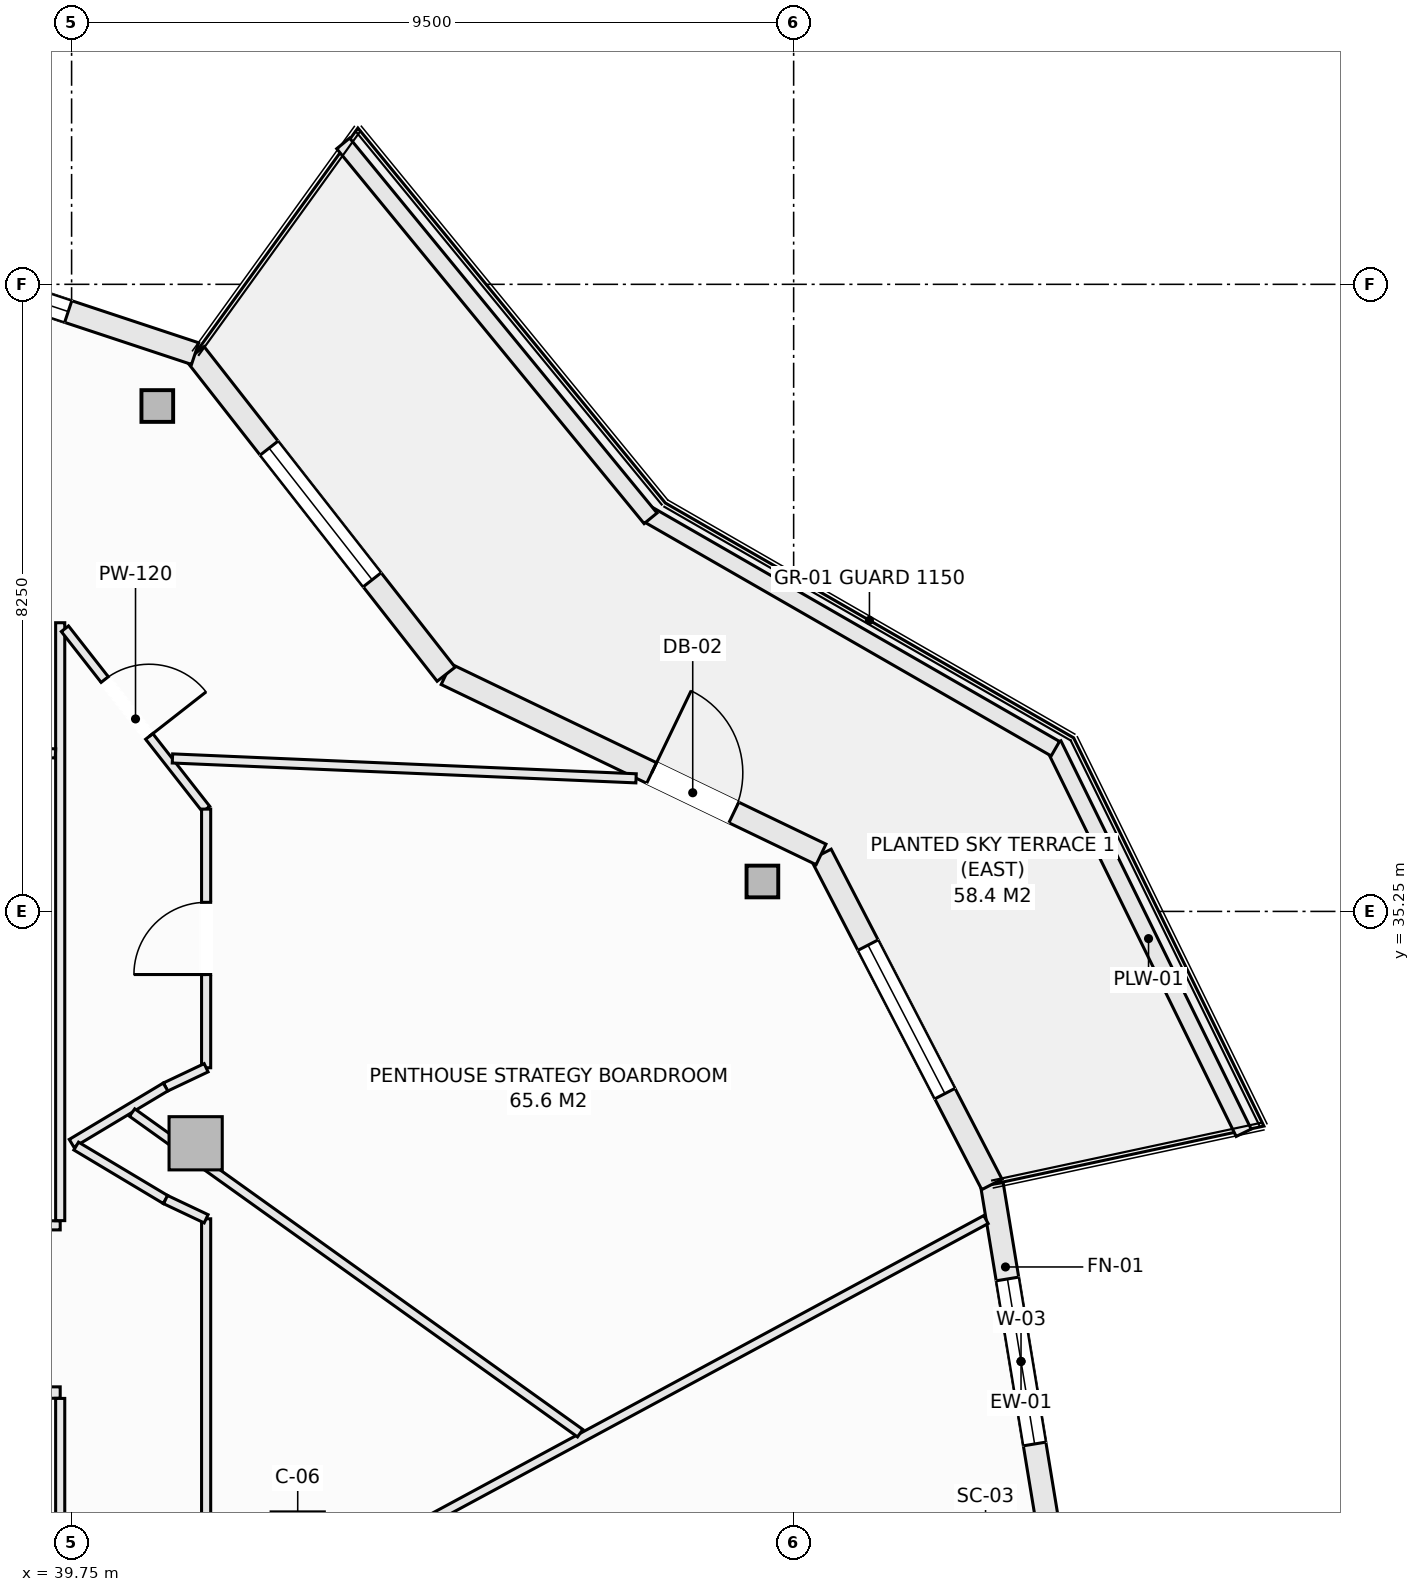
"""IFC4 building model, lengths in metres.
Left out: names, types, materials, properties, quantities, classifications, styles, units other than length and angle.
Written with IfcOpenShell. Run it as: python <this file> out.ifc"""

import sys

from ifc_helpers import new_model, si_unit, direction, frame, frame_2d, origin, origin_2d, place, context, subcontext, project, spatial, rectangle, hollow_rectangle, extrude, element, fill, save


model = new_model("IFC4")
c1 = context("Model", 3, precision=1e-05, world=origin(), true_north=direction((0.0, 1.0)))
c2 = subcontext(c1, "Body", "Model", "MODEL_VIEW")
j1 = project(units=[si_unit("LENGTHUNIT", "METRE"), si_unit("PLANEANGLEUNIT", "RADIAN")], contexts=[c1])
p1 = place(None, origin())
s1 = spatial("IfcSite", under=j1, at=p1, CompositionType="ELEMENT")
p2 = place(p1, origin())
s2 = spatial("IfcBuilding", under=s1, at=p2, CompositionType="ELEMENT")
p3 = place(p2, frame((0.0, 0.0, 255.8)))
s3 = spatial("IfcBuildingStorey", under=s2, at=p3, CompositionType="ELEMENT", Elevation=255.8)
for number, where, z_axis, x_axis in (
    (1, (48.839, 35.644, -0.27), (0.0, 0.0, 1.0), (1.0, 0.0, 0.0)),
    (2, (40.878, 41.899, -0.27), (0.0, 0.0, 1.0), (1.0, 0.0, 0.0)),
):
    element("IfcColumn", number, at=place(p3, frame(where, z_axis=z_axis, x_axis=x_axis)), inside=s3, PredefinedType="COLUMN", context=c2, shape_type="SweptSolid", body=[
        extrude(hollow_rectangle(XDim=0.406, YDim=0.406, WallThickness=0.016, at=origin_2d()), origin(), (0.0, 0.0, 1.0), 3.3),
    ])
for number, where, z_axis, x_axis in (
    (3, (42.725, 27.0, -0.27), (0.0, 0.0, 1.0), (1.0, 0.0, 0.0)),
    (4, (41.382, 32.199, -0.27), (0.0, 0.0, 1.0), (1.0, 0.0, 0.0)),
):
    element("IfcColumn", number, at=place(p3, frame(where, z_axis=z_axis, x_axis=x_axis)), inside=s3, PredefinedType="COLUMN", context=c2, shape_type="SweptSolid", body=[
        extrude(rectangle(XDim=0.7, YDim=0.7, at=origin_2d()), origin(), (0.0, 0.0, 1.0), 3.3),
    ])
p4 = place(p3, frame((51.858, 31.659, 0.0), z_axis=(0.0, 0.0, 1.0), x_axis=(0.162369371657, -0.986730047758, 0.0)))
e5 = element("IfcWall", 5, at=p4, inside=s3, PredefinedType="SOLIDWALL", context=c2, shape_type="SweptSolid", body=[
    extrude(rectangle(XDim=4.721, YDim=0.3, at=frame_2d((2.361, 0.0))), origin(), (0.0, 0.0, 1.0), 2.605),
])
p5 = place(p4, frame((1.261, 0.0, 0.72)))
e6 = element("IfcOpeningElement", 6, at=p5, cuts=e5, PredefinedType="OPENING", context=c2, shape_type="SweptSolid", body=[
    extrude(rectangle(XDim=2.2, YDim=1.65, at=frame_2d((1.1, 0.825))), frame((0.0, 0.16, 0.0), z_axis=(0.0, -1.0, 0.0), x_axis=(1.0, 0.0, 0.0)), (0.0, 0.0, 1.0), 0.32),
])
p6 = place(p3, frame((49.611, 36.0, 0.0), z_axis=(0.0, 0.0, 1.0), x_axis=(0.459793771602, -0.888025724625, 0.0)))
e7 = element("IfcWall", 7, at=p6, inside=s3, PredefinedType="SOLIDWALL", context=c2, shape_type="SweptSolid", body=[
    extrude(rectangle(XDim=4.889, YDim=0.3, at=frame_2d((2.444, 0.0))), origin(), (0.0, 0.0, 1.0), 2.605),
])
p7 = place(p6, frame((1.344, 0.0, 0.72)))
e8 = element("IfcOpeningElement", 8, at=p7, cuts=e7, PredefinedType="OPENING", context=c2, shape_type="SweptSolid", body=[
    extrude(rectangle(XDim=2.2, YDim=1.65, at=frame_2d((1.1, 0.825))), frame((0.0, 0.16, 0.0), z_axis=(0.0, -1.0, 0.0), x_axis=(1.0, 0.0, 0.0)), (0.0, 0.0, 1.0), 0.32),
])
p8 = place(p3, frame((44.677, 38.37, 0.0), z_axis=(0.0, 0.0, 1.0), x_axis=(0.901355238351, -0.433080517106, 0.0)))
e9 = element("IfcWall", 9, at=p8, inside=s3, PredefinedType="SOLIDWALL", context=c2, shape_type="SweptSolid", body=[
    extrude(rectangle(XDim=5.473, YDim=0.3, at=frame_2d((2.737, 0.0))), origin(), (0.0, 0.0, 1.0), 2.605),
])
p9 = place(p8, frame((3.0, 0.0, 0.0)))
e10 = element("IfcOpeningElement", 10, at=p9, cuts=e9, PredefinedType="OPENING", context=c2, shape_type="SweptSolid", body=[
    extrude(rectangle(XDim=1.2, YDim=2.2, at=frame_2d((0.6, 1.1))), frame((0.0, 0.16, 0.0), z_axis=(0.0, -1.0, 0.0), x_axis=(1.0, 0.0, 0.0)), (0.0, 0.0, 1.0), 0.32),
])
p10 = place(p3, frame((41.375, 42.588, 0.0), z_axis=(0.0, 0.0, 1.0), x_axis=(0.61644588519, -0.787397276241, 0.0)))
e11 = element("IfcWall", 11, at=p10, inside=s3, PredefinedType="SOLIDWALL", context=c2, shape_type="SweptSolid", body=[
    extrude(rectangle(XDim=5.357, YDim=0.3, at=frame_2d((2.678, 0.0))), origin(), (0.0, 0.0, 1.0), 2.605),
])
p11 = place(p10, frame((1.579, 0.0, 0.72)))
e12 = element("IfcOpeningElement", 12, at=p11, cuts=e11, PredefinedType="OPENING", context=c2, shape_type="SweptSolid", body=[
    extrude(rectangle(XDim=2.2, YDim=1.65, at=frame_2d((1.1, 0.825))), frame((0.0, 0.16, 0.0), z_axis=(0.0, -1.0, 0.0), x_axis=(1.0, 0.0, 0.0)), (0.0, 0.0, 1.0), 0.32),
])
p12 = place(p3, frame((35.948, 44.387, 0.0), z_axis=(0.0, 0.0, 1.0), x_axis=(0.949232769585, -0.314574552605, 0.0)))
e13 = element("IfcWall", 13, at=p12, inside=s3, PredefinedType="SOLIDWALL", context=c2, shape_type="SweptSolid", body=[
    extrude(rectangle(XDim=5.717, YDim=0.3, at=frame_2d((2.858, 0.0))), origin(), (0.0, 0.0, 1.0), 2.605),
])
p13 = place(p12, frame((1.758, 0.0, 0.72)))
e14 = element("IfcOpeningElement", 14, at=p13, cuts=e13, PredefinedType="OPENING", context=c2, shape_type="SweptSolid", body=[
    extrude(rectangle(XDim=2.2, YDim=1.65, at=frame_2d((1.1, 0.825))), frame((0.0, 0.16, 0.0), z_axis=(0.0, -1.0, 0.0), x_axis=(1.0, 0.0, 0.0)), (0.0, 0.0, 1.0), 0.32),
])
p14 = place(p3, frame((52.667, 37.447, 0.0), z_axis=(0.0, 0.0, 1.0), x_axis=(0.440058847499, -0.897968936399, 0.0)))
e15 = element("IfcWall", 15, at=p14, inside=s3, PredefinedType="PARAPET", context=c2, shape_type="SweptSolid", body=[
    extrude(rectangle(XDim=5.689, YDim=0.22, at=frame_2d((2.845, 0.0))), origin(), (0.0, 0.0, 1.0), 0.52),
])
p15 = place(p3, frame((47.321, 40.479, 0.0), z_axis=(0.0, 0.0, 1.0), x_axis=(0.866901621005, -0.49847926687, 0.0)))
e16 = element("IfcWall", 16, at=p15, inside=s3, PredefinedType="PARAPET", context=c2, shape_type="SweptSolid", body=[
    extrude(rectangle(XDim=6.197, YDim=0.22, at=frame_2d((3.098, 0.0))), origin(), (0.0, 0.0, 1.0), 0.52),
])
p16 = place(p3, frame((43.323, 45.354, 0.0), z_axis=(0.0, 0.0, 1.0), x_axis=(0.63407318032, -0.77327304492, 0.0)))
e17 = element("IfcWall", 17, at=p16, inside=s3, PredefinedType="PARAPET", context=c2, shape_type="SweptSolid", body=[
    extrude(rectangle(XDim=6.379, YDim=0.22, at=frame_2d((3.189, 0.0))), origin(), (0.0, 0.0, 1.0), 0.52),
])
p17 = place(p3, frame((30.077, 28.92, 0.0), z_axis=(0.0, 0.0, 1.0), x_axis=(1.0, 0.0, 0.0)))
e18 = element("IfcWall", 18, at=p17, inside=s3, PredefinedType="PARTITIONING", context=c2, shape_type="SweptSolid", body=[
    extrude(rectangle(XDim=9.523, YDim=0.15, at=frame_2d((4.762, 0.0))), origin(), (0.0, 0.0, 1.0), 3.03),
])
p18 = place(p3, frame((38.862, 31.12, 0.0), z_axis=(0.0, 0.0, 1.0), x_axis=(1.0, 0.0, 0.0)))
e19 = element("IfcWall", 19, at=p18, inside=s3, PredefinedType="PARTITIONING", context=c2, shape_type="SweptSolid", body=[
    extrude(rectangle(XDim=0.738, YDim=0.12, at=frame_2d((0.369, 0.0))), origin(), (0.0, 0.0, 1.0), 3.03),
])
p19 = place(p3, frame((39.6, 25.197, 0.0), z_axis=(0.0, 0.0, 1.0), x_axis=(0.0, 1.0, 0.0)))
e20 = element("IfcWall", 20, at=p19, inside=s3, PredefinedType="PARTITIONING", context=c2, shape_type="SweptSolid", body=[
    extrude(rectangle(XDim=3.646, YDim=0.12, at=frame_2d((1.823, 0.0))), origin(), (0.0, 0.0, 1.0), 3.03),
])
p20 = place(p3, frame((39.6, 31.182, 0.0), z_axis=(0.0, 0.0, 1.0), x_axis=(0.0, 1.0, 0.0)))
e21 = element("IfcWall", 21, at=p20, inside=s3, PredefinedType="PARTITIONING", context=c2, shape_type="SweptSolid", body=[
    extrude(rectangle(XDim=7.866, YDim=0.12, at=frame_2d((3.933, 0.0))), origin(), (0.0, 0.0, 1.0), 3.03),
])
p21 = place(p3, frame((39.662, 38.969, 0.0), z_axis=(0.0, 0.0, 1.0), x_axis=(0.616500468458, -0.787354540465, 0.0)))
e22 = element("IfcWall", 22, at=p21, inside=s3, PredefinedType="PARTITIONING", context=c2, shape_type="SweptSolid", body=[
    extrude(rectangle(XDim=3.014, YDim=0.12, at=frame_2d((1.507, 0.0))), origin(), (0.0, 0.0, 1.0), 3.03),
])
p22 = place(p21, frame((0.849, 0.0, 0.0)))
e23 = element("IfcOpeningElement", 23, at=p22, cuts=e22, PredefinedType="OPENING", context=c2, shape_type="SweptSolid", body=[
    extrude(rectangle(XDim=0.95, YDim=2.1, at=frame_2d((0.475, 1.05))), frame((0.0, 0.07, 0.0), z_axis=(0.0, -1.0, 0.0), x_axis=(1.0, 0.0, 0.0)), (0.0, 0.0, 1.0), 0.14),
])
p23 = place(p3, frame((41.52, 22.794, 0.0), z_axis=(0.0, 0.0, 1.0), x_axis=(0.0, 1.0, 0.0)))
e24 = element("IfcWall", 24, at=p23, inside=s3, PredefinedType="PARTITIONING", context=c2, shape_type="SweptSolid", body=[
    extrude(rectangle(XDim=8.412, YDim=0.12, at=frame_2d((4.206, 0.0))), origin(), (0.0, 0.0, 1.0), 2.478),
])
p24 = place(p3, frame((41.52, 33.193, 0.0), z_axis=(0.0, 0.0, 1.0), x_axis=(0.0, 1.0, 0.0)))
e25 = element("IfcWall", 25, at=p24, inside=s3, PredefinedType="PARTITIONING", context=c2, shape_type="SweptSolid", body=[
    extrude(rectangle(XDim=3.403, YDim=0.12, at=frame_2d((1.701, 0.0))), origin(), (0.0, 0.0, 1.0), 3.03),
])
p25 = place(p24, frame((1.227, 0.0, 0.0)))
e26 = element("IfcOpeningElement", 26, at=p25, cuts=e25, PredefinedType="OPENING", context=c2, shape_type="SweptSolid", body=[
    extrude(rectangle(XDim=0.95, YDim=2.1, at=frame_2d((0.475, 1.05))), frame((0.0, 0.07, 0.0), z_axis=(0.0, -1.0, 0.0), x_axis=(1.0, 0.0, 0.0)), (0.0, 0.0, 1.0), 0.14),
])
p26 = place(p3, frame((40.986, 32.94, 0.0), z_axis=(0.0, 0.0, 1.0), x_axis=(0.90356951601, 0.428441512621, 0.0)))
e27 = element("IfcWall", 27, at=p26, inside=s3, PredefinedType="PARTITIONING", context=c2, shape_type="SweptSolid", body=[
    extrude(rectangle(XDim=0.591, YDim=0.12, at=frame_2d((0.295, 0.0))), origin(), (0.0, 0.0, 1.0), 3.03),
])
p27 = place(p3, frame((39.75, 32.199, 0.0), z_axis=(0.0, 0.0, 1.0), x_axis=(0.857702120906, 0.514146935996, 0.0)))
e28 = element("IfcWall", 28, at=p27, inside=s3, PredefinedType="PARTITIONING", context=c2, shape_type="SweptSolid", body=[
    extrude(rectangle(XDim=1.441, YDim=0.12, at=frame_2d((0.721, 0.0))), origin(), (0.0, 0.0, 1.0), 3.03),
])
p28 = place(p3, frame((39.81, 32.163, 0.0), z_axis=(0.0, 0.0, 1.0), x_axis=(0.858011245414, -0.513630901273, 0.0)))
e29 = element("IfcWall", 29, at=p28, inside=s3, PredefinedType="PARTITIONING", context=c2, shape_type="SweptSolid", body=[
    extrude(rectangle(XDim=1.37, YDim=0.12, at=frame_2d((0.685, 0.0))), origin(), (0.0, 0.0, 1.0), 3.03),
])
p29 = place(p3, frame((40.986, 31.459, 0.0), z_axis=(0.0, 0.0, 1.0), x_axis=(0.903729424576, -0.428104107847, 0.0)))
e30 = element("IfcWall", 30, at=p29, inside=s3, PredefinedType="PARTITIONING", context=c2, shape_type="SweptSolid", body=[
    extrude(rectangle(XDim=0.591, YDim=0.12, at=frame_2d((0.295, 0.0))), origin(), (0.0, 0.0, 1.0), 3.03),
])
p30 = place(p3, frame((41.582, 25.693, 0.0), z_axis=(0.0, 0.0, 1.0), x_axis=(0.880032375067, 0.474913696195, 0.0)))
e31 = element("IfcWall", 31, at=p30, inside=s3, PredefinedType="PARTITIONING", context=c2, shape_type="SweptSolid", body=[
    extrude(rectangle(XDim=11.589, YDim=0.12, at=frame_2d((5.794, 0.0))), origin(), (0.0, 0.0, 1.0), 1.823),
])
p31 = place(p3, frame((40.546, 32.604, 0.0), z_axis=(0.0, 0.0, 1.0), x_axis=(0.813264440548, -0.581894277116, 0.0)))
e32 = element("IfcWall", 32, at=p31, inside=s3, PredefinedType="PARTITIONING", context=c2, shape_type="SweptSolid", body=[
    extrude(rectangle(XDim=7.249, YDim=0.12, at=frame_2d((3.625, 0.0))), origin(), (0.0, 0.0, 1.0), 3.03),
])
p32 = place(p3, frame((33.699, 37.579, 0.0), z_axis=(0.0, 0.0, 1.0), x_axis=(0.999081056781, -0.042860727724, 0.0)))
e33 = element("IfcWall", 33, at=p32, inside=s3, PredefinedType="PARTITIONING", context=c2, shape_type="SweptSolid", body=[
    extrude(rectangle(XDim=5.844, YDim=0.12, at=frame_2d((2.922, 0.0))), origin(), (0.0, 0.0, 1.0), 2.478),
])
p33 = place(p3, frame((41.077, 37.262, 0.0), z_axis=(0.0, 0.0, 1.0), x_axis=(0.999080744008, -0.042868017834, 0.0)))
e34 = element("IfcWall", 34, at=p33, inside=s3, PredefinedType="PARTITIONING", context=c2, shape_type="SweptSolid", body=[
    extrude(rectangle(XDim=6.105, YDim=0.12, at=frame_2d((3.053, 0.0))), origin(), (0.0, 0.0, 1.0), 2.605),
])
p34 = place(p5, origin())
e35 = element("IfcWindow", 35, at=p34, inside=s3, PartitioningType="SINGLE_PANEL", PredefinedType="WINDOW", context=c2, shape_type="SweptSolid", body=[
    extrude(rectangle(XDim=2.2, YDim=1.65, at=frame_2d((1.1, 0.825))), frame((0.0, 0.03, 0.0), z_axis=(0.0, -1.0, 0.0), x_axis=(1.0, 0.0, 0.0)), (0.0, 0.0, 1.0), 0.06),
])
fill(e6, e35)
p35 = place(p7, origin())
e36 = element("IfcWindow", 36, at=p35, inside=s3, PartitioningType="SINGLE_PANEL", PredefinedType="WINDOW", context=c2, shape_type="SweptSolid", body=[
    extrude(rectangle(XDim=2.2, YDim=1.65, at=frame_2d((1.1, 0.825))), frame((0.0, 0.03, 0.0), z_axis=(0.0, -1.0, 0.0), x_axis=(1.0, 0.0, 0.0)), (0.0, 0.0, 1.0), 0.06),
])
fill(e8, e36)
p36 = place(p9, origin())
e37 = element("IfcDoor", 37, at=p36, inside=s3, OperationType="SINGLE_SWING_LEFT", PredefinedType="DOOR", context=c2, shape_type="SweptSolid", body=[
    extrude(rectangle(XDim=1.2, YDim=2.2, at=frame_2d((0.6, 1.1))), frame((0.0, 0.025, 0.0), z_axis=(0.0, -1.0, 0.0), x_axis=(1.0, 0.0, 0.0)), (0.0, 0.0, 1.0), 0.05),
])
fill(e10, e37)
p37 = place(p11, origin())
e38 = element("IfcWindow", 38, at=p37, inside=s3, PartitioningType="SINGLE_PANEL", PredefinedType="WINDOW", context=c2, shape_type="SweptSolid", body=[
    extrude(rectangle(XDim=2.2, YDim=1.65, at=frame_2d((1.1, 0.825))), frame((0.0, 0.03, 0.0), z_axis=(0.0, -1.0, 0.0), x_axis=(1.0, 0.0, 0.0)), (0.0, 0.0, 1.0), 0.06),
])
fill(e12, e38)
p38 = place(p13, origin())
e39 = element("IfcWindow", 39, at=p38, inside=s3, PartitioningType="SINGLE_PANEL", PredefinedType="WINDOW", context=c2, shape_type="SweptSolid", body=[
    extrude(rectangle(XDim=2.2, YDim=1.65, at=frame_2d((1.1, 0.825))), frame((0.0, 0.03, 0.0), z_axis=(0.0, -1.0, 0.0), x_axis=(1.0, 0.0, 0.0)), (0.0, 0.0, 1.0), 0.06),
])
fill(e14, e39)
p39 = place(p25, origin())
e40 = element("IfcDoor", 40, at=p39, inside=s3, OperationType="SINGLE_SWING_LEFT", PredefinedType="DOOR", context=c2, shape_type="SweptSolid", body=[
    extrude(rectangle(XDim=0.95, YDim=2.1, at=frame_2d((0.475, 1.05))), frame((0.0, 0.025, 0.0), z_axis=(0.0, -1.0, 0.0), x_axis=(1.0, 0.0, 0.0)), (0.0, 0.0, 1.0), 0.05),
])
fill(e26, e40)
p40 = place(p22, origin())
e41 = element("IfcDoor", 41, at=p40, inside=s3, OperationType="SINGLE_SWING_RIGHT", PredefinedType="DOOR", context=c2, shape_type="SweptSolid", body=[
    extrude(rectangle(XDim=0.95, YDim=2.1, at=frame_2d((0.475, 1.05))), frame((0.0, 0.025, 0.0), z_axis=(0.0, -1.0, 0.0), x_axis=(1.0, 0.0, 0.0)), (0.0, 0.0, 1.0), 0.05),
])
fill(e23, e41)
save(model, sys.argv[1])
